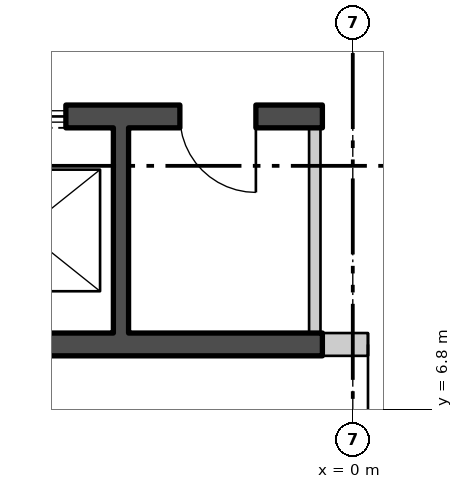
"""IFC4 building model, lengths in metres.
Left out: names, types, materials, properties, quantities, classifications, styles, units other than length and angle.
Written with IfcOpenShell. Run it as: python <this file> out.ifc"""

import sys

from ifc_helpers import new_model, si_unit, direction, frame, frame_2d, origin, place, context, subcontext, project, spatial, polyline, rectangle, outline, extrude, element, fill, save


model = new_model("IFC4")
c1 = context("Model", 3, precision=1e-05, world=origin(), true_north=direction((0.0, 1.0)))
c2 = subcontext(c1, "Body", "Model", "MODEL_VIEW")
j1 = project(units=[si_unit("LENGTHUNIT", "METRE"), si_unit("PLANEANGLEUNIT", "RADIAN")], contexts=[c1])
p1 = place(None, origin())
s1 = spatial("IfcSite", under=j1, at=p1, CompositionType="ELEMENT")
p2 = place(p1, origin())
s2 = spatial("IfcBuilding", under=s1, at=p2, CompositionType="ELEMENT")
p3 = place(p2, frame((0.0, 0.0, 216.0)))
s3 = spatial("IfcBuildingStorey", under=s2, at=p3, CompositionType="ELEMENT", Elevation=216.0)
p4 = place(p3, frame((-26.235, 14.155, -0.18), z_axis=(0.0, 0.0, 1.0), x_axis=(0.500000335318, -0.866025210188, 0.0)))
e1 = element("IfcWall", 1, at=p4, inside=s3, PredefinedType="SOLIDWALL", context=c2, shape_type="SweptSolid", body=[
    extrude(outline(polyline([(-0.13, -0.225), (45.88, -0.225), (45.62, 0.225), (0.13, 0.225), (-0.13, -0.225)])), origin(), (0.0, 0.0, 1.0), 3.68),
])
p5 = place(p4, frame((1.425, 0.0, 1.08)))
e2 = element("IfcOpeningElement", 2, at=p5, cuts=e1, PredefinedType="OPENING", context=c2, shape_type="SweptSolid", body=[
    extrude(rectangle(XDim=2.4, YDim=2.0, at=frame_2d((1.2, 1.0))), frame((0.0, 0.235, 0.0), z_axis=(0.0, -1.0, 0.0), x_axis=(1.0, 0.0, 0.0)), (0.0, 0.0, 1.0), 0.47),
])
p6 = place(p4, frame((5.895, 0.0, 1.08)))
e3 = element("IfcOpeningElement", 3, at=p6, cuts=e1, PredefinedType="OPENING", context=c2, shape_type="SweptSolid", body=[
    extrude(rectangle(XDim=2.4, YDim=2.0, at=frame_2d((1.2, 1.0))), frame((0.0, 0.235, 0.0), z_axis=(0.0, -1.0, 0.0), x_axis=(1.0, 0.0, 0.0)), (0.0, 0.0, 1.0), 0.47),
])
p7 = place(p4, frame((10.403, 0.0, 1.08)))
e4 = element("IfcOpeningElement", 4, at=p7, cuts=e1, PredefinedType="OPENING", context=c2, shape_type="SweptSolid", body=[
    extrude(rectangle(XDim=2.4, YDim=2.0, at=frame_2d((1.2, 1.0))), frame((0.0, 0.235, 0.0), z_axis=(0.0, -1.0, 0.0), x_axis=(1.0, 0.0, 0.0)), (0.0, 0.0, 1.0), 0.47),
])
p8 = place(p4, frame((19.421, 0.0, 1.08)))
e5 = element("IfcOpeningElement", 5, at=p8, cuts=e1, PredefinedType="OPENING", context=c2, shape_type="SweptSolid", body=[
    extrude(rectangle(XDim=2.4, YDim=2.0, at=frame_2d((1.2, 1.0))), frame((0.0, 0.235, 0.0), z_axis=(0.0, -1.0, 0.0), x_axis=(1.0, 0.0, 0.0)), (0.0, 0.0, 1.0), 0.47),
])
p9 = place(p4, frame((23.929, 0.0, 1.08)))
e6 = element("IfcOpeningElement", 6, at=p9, cuts=e1, PredefinedType="OPENING", context=c2, shape_type="SweptSolid", body=[
    extrude(rectangle(XDim=2.4, YDim=2.0, at=frame_2d((1.2, 1.0))), frame((0.0, 0.235, 0.0), z_axis=(0.0, -1.0, 0.0), x_axis=(1.0, 0.0, 0.0)), (0.0, 0.0, 1.0), 0.47),
])
p10 = place(p4, frame((28.438, 0.0, 1.08)))
e7 = element("IfcOpeningElement", 7, at=p10, cuts=e1, PredefinedType="OPENING", context=c2, shape_type="SweptSolid", body=[
    extrude(rectangle(XDim=2.4, YDim=2.0, at=frame_2d((1.2, 1.0))), frame((0.0, 0.235, 0.0), z_axis=(0.0, -1.0, 0.0), x_axis=(1.0, 0.0, 0.0)), (0.0, 0.0, 1.0), 0.47),
])
p11 = place(p4, frame((32.947, 0.0, 1.08)))
e8 = element("IfcOpeningElement", 8, at=p11, cuts=e1, PredefinedType="OPENING", context=c2, shape_type="SweptSolid", body=[
    extrude(rectangle(XDim=2.4, YDim=2.0, at=frame_2d((1.2, 1.0))), frame((0.0, 0.235, 0.0), z_axis=(0.0, -1.0, 0.0), x_axis=(1.0, 0.0, 0.0)), (0.0, 0.0, 1.0), 0.47),
])
p12 = place(p4, frame((41.925, 0.0, 1.08)))
e9 = element("IfcOpeningElement", 9, at=p12, cuts=e1, PredefinedType="OPENING", context=c2, shape_type="SweptSolid", body=[
    extrude(rectangle(XDim=2.4, YDim=2.0, at=frame_2d((1.2, 1.0))), frame((0.0, 0.235, 0.0), z_axis=(0.0, -1.0, 0.0), x_axis=(1.0, 0.0, 0.0)), (0.0, 0.0, 1.0), 0.47),
])
p13 = place(p3, frame((-10.7, 10.65, 0.0), z_axis=(0.0, 0.0, 1.0), x_axis=(1.0, 0.0, 0.0)))
e10 = element("IfcWall", 10, at=p13, inside=s3, PredefinedType="SHEAR", context=c2, shape_type="SweptSolid", body=[
    extrude(rectangle(XDim=10.3, YDim=0.3, at=frame_2d((5.15, 0.0))), origin(), (0.0, 0.0, 1.0), 3.7),
])
p14 = place(p13, frame((0.675, 0.0, 0.0)))
e11 = element("IfcOpeningElement", 11, at=p14, cuts=e10, PredefinedType="OPENING", context=c2, shape_type="SweptSolid", body=[
    extrude(rectangle(XDim=1.1, YDim=2.1, at=frame_2d((0.55, 1.05))), frame((0.0, 0.16, 0.0), z_axis=(0.0, -1.0, 0.0), x_axis=(1.0, 0.0, 0.0)), (0.0, 0.0, 1.0), 0.32),
])
p15 = place(p13, frame((3.275, 0.0, 0.0)))
e12 = element("IfcOpeningElement", 12, at=p15, cuts=e10, PredefinedType="OPENING", context=c2, shape_type="SweptSolid", body=[
    extrude(rectangle(XDim=1.1, YDim=2.1, at=frame_2d((0.55, 1.05))), frame((0.0, 0.16, 0.0), z_axis=(0.0, -1.0, 0.0), x_axis=(1.0, 0.0, 0.0)), (0.0, 0.0, 1.0), 0.32),
])
p16 = place(p13, frame((5.825, 0.0, 0.0)))
e13 = element("IfcOpeningElement", 13, at=p16, cuts=e10, PredefinedType="OPENING", context=c2, shape_type="SweptSolid", body=[
    extrude(rectangle(XDim=1.1, YDim=2.1, at=frame_2d((0.55, 1.05))), frame((0.0, 0.16, 0.0), z_axis=(0.0, -1.0, 0.0), x_axis=(1.0, 0.0, 0.0)), (0.0, 0.0, 1.0), 0.32),
])
p17 = place(p13, frame((8.425, 0.0, 0.0)))
e14 = element("IfcOpeningElement", 14, at=p17, cuts=e10, PredefinedType="OPENING", context=c2, shape_type="SweptSolid", body=[
    extrude(rectangle(XDim=1.0, YDim=2.1, at=frame_2d((0.5, 1.05))), frame((0.0, 0.16, 0.0), z_axis=(0.0, -1.0, 0.0), x_axis=(1.0, 0.0, 0.0)), (0.0, 0.0, 1.0), 0.32),
])
p18 = place(p3, frame((-10.7, 7.65, 0.0), z_axis=(0.0, 0.0, 1.0), x_axis=(1.0, 0.0, 0.0)))
e15 = element("IfcWall", 15, at=p18, inside=s3, PredefinedType="SHEAR", context=c2, shape_type="SweptSolid", body=[
    extrude(rectangle(XDim=10.3, YDim=0.3, at=frame_2d((5.15, 0.0))), origin(), (0.0, 0.0, 1.0), 3.7),
])
p19 = place(p3, frame((-3.05, 7.8, 0.0), z_axis=(0.0, 0.0, 1.0), x_axis=(0.0, 1.0, 0.0)))
e16 = element("IfcWall", 16, at=p19, inside=s3, PredefinedType="SHEAR", context=c2, shape_type="SweptSolid", body=[
    extrude(rectangle(XDim=2.7, YDim=0.2, at=frame_2d((1.35, 0.0))), origin(), (0.0, 0.0, 1.0), 3.7),
])
p20 = place(p3, frame((-0.5, 7.8, 0.0), z_axis=(0.0, 0.0, 1.0), x_axis=(0.0, 1.0, 0.0)))
e17 = element("IfcWall", 17, at=p20, inside=s3, PredefinedType="PARTITIONING", context=c2, shape_type="SweptSolid", body=[
    extrude(rectangle(XDim=2.7, YDim=0.15, at=frame_2d((1.35, 0.0))), origin(), (0.0, 0.0, 1.0), 3.7),
])
p21 = place(p3, frame((-0.4, 7.65, 0.0), z_axis=(0.0, 0.0, 1.0), x_axis=(1.0, 0.0, 0.0)))
e18 = element("IfcWall", 18, at=p21, inside=s3, PredefinedType="PARTITIONING", context=c2, shape_type="SweptSolid", body=[
    extrude(rectangle(XDim=3.0, YDim=0.3, at=frame_2d((1.5, 0.0))), origin(), (0.0, 0.0, 1.0), 3.7),
])
p22 = place(p21, frame((0.6, 0.0, 0.0)))
e19 = element("IfcOpeningElement", 19, at=p22, cuts=e18, PredefinedType="OPENING", context=c2, shape_type="SweptSolid", body=[
    extrude(rectangle(XDim=1.8, YDim=2.4, at=frame_2d((0.9, 1.2))), frame((0.0, 0.16, 0.0), z_axis=(0.0, -1.0, 0.0), x_axis=(1.0, 0.0, 0.0)), (0.0, 0.0, 1.0), 0.32),
])
p23 = place(p16, origin())
e20 = element("IfcDoor", 20, at=p23, inside=s3, OperationType="SLIDING_TO_LEFT", PredefinedType="DOOR", context=c2, shape_type="SweptSolid", body=[
    extrude(rectangle(XDim=1.1, YDim=2.1, at=frame_2d((0.55, 1.05))), frame((0.0, 0.025, 0.0), z_axis=(0.0, -1.0, 0.0), x_axis=(1.0, 0.0, 0.0)), (0.0, 0.0, 1.0), 0.05),
])
fill(e13, e20)
p24 = place(p17, origin())
e21 = element("IfcDoor", 21, at=p24, inside=s3, OperationType="SINGLE_SWING_RIGHT", PredefinedType="DOOR", context=c2, shape_type="SweptSolid", body=[
    extrude(rectangle(XDim=1.0, YDim=2.1, at=frame_2d((0.5, 1.05))), frame((0.0, 0.025, 0.0), z_axis=(0.0, -1.0, 0.0), x_axis=(1.0, 0.0, 0.0)), (0.0, 0.0, 1.0), 0.05),
])
fill(e14, e21)
p25 = place(p22, origin())
e22 = element("IfcDoor", 22, at=p25, inside=s3, OperationType="DOUBLE_DOOR_SINGLE_SWING", PredefinedType="DOOR", context=c2, shape_type="SweptSolid", body=[
    extrude(rectangle(XDim=1.8, YDim=2.4, at=frame_2d((0.9, 1.2))), frame((0.0, 0.025, 0.0), z_axis=(0.0, -1.0, 0.0), x_axis=(1.0, 0.0, 0.0)), (0.0, 0.0, 1.0), 0.05),
])
fill(e19, e22)
save(model, sys.argv[1])
